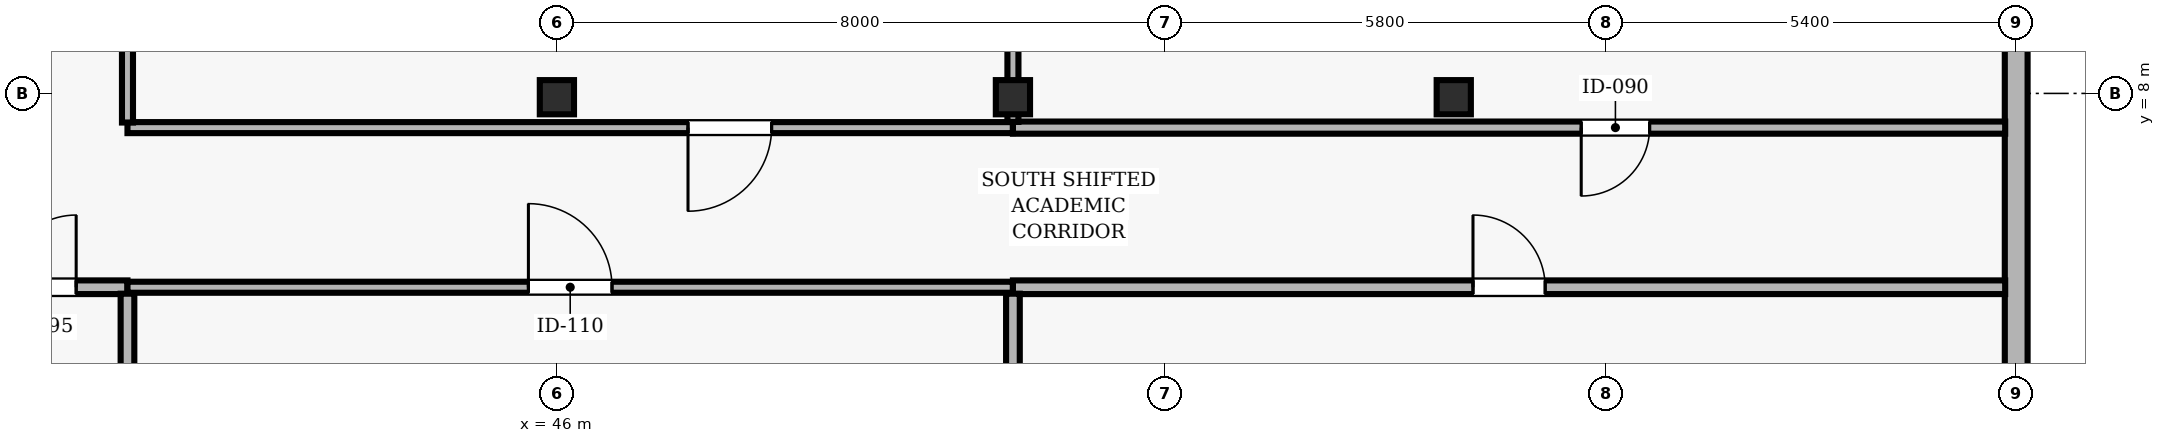
"""IFC4 building model, lengths in metres.
Left out: names, types, materials, properties, quantities, classifications, styles, units other than length and angle.
Written with IfcOpenShell. Run it as: python <this file> out.ifc"""

import sys

from ifc_helpers import new_model, si_unit, direction, frame, frame_2d, origin, origin_2d, place, context, subcontext, project, spatial, rectangle, hollow_rectangle, extrude, element, fill, save


model = new_model("IFC4")
c1 = context("Model", 3, precision=1e-05, world=origin(), true_north=direction((0.0, 1.0)))
c2 = subcontext(c1, "Body", "Model", "MODEL_VIEW")
j1 = project(units=[si_unit("LENGTHUNIT", "METRE"), si_unit("PLANEANGLEUNIT", "RADIAN")], contexts=[c1])
p1 = place(None, origin())
s1 = spatial("IfcSite", under=j1, at=p1, CompositionType="ELEMENT")
p2 = place(p1, origin())
s2 = spatial("IfcBuilding", under=s1, at=p2, CompositionType="ELEMENT")
p3 = place(p2, frame((0.0, 0.0, 191.4)))
s3 = spatial("IfcBuildingStorey", under=s2, at=p3, CompositionType="ELEMENT", Elevation=191.4)
for number, where, z_axis, x_axis in (
    (1, (46.0, 7.95, 0.0), (0.0, 0.0, 1.0), (1.0, 0.0, 0.0)),
    (2, (52.0, 7.95, 0.0), (0.0, 0.0, 1.0), (1.0, 0.0, 0.0)),
    (3, (57.8, 7.95, 0.0), (0.0, 0.0, 1.0), (1.0, 0.0, 0.0)),
):
    element("IfcColumn", number, at=place(p3, frame(where, z_axis=z_axis, x_axis=x_axis)), inside=s3, PredefinedType="COLUMN", context=c2, shape_type="SweptSolid", body=[
        extrude(hollow_rectangle(XDim=0.45, YDim=0.45, WallThickness=0.02, at=origin_2d()), origin(), (0.0, 0.0, 1.0), 3.9),
    ])
p4 = place(p3, frame((65.2, 2.5, 0.0), z_axis=(0.0, 0.0, 1.0), x_axis=(0.0, 1.0, 0.0)))
e4 = element("IfcWall", 4, at=p4, inside=s3, PredefinedType="SOLIDWALL", context=c2, shape_type="SweptSolid", body=[
    extrude(rectangle(XDim=11.0, YDim=0.3, at=frame_2d((5.5, 0.0))), origin(), (0.0, 0.0, 1.0), 3.69),
])
p5 = place(p4, frame((7.65, 0.0, 0.9)))
e5 = element("IfcOpeningElement", 5, at=p5, cuts=e4, PredefinedType="OPENING", context=c2, shape_type="SweptSolid", body=[
    extrude(rectangle(XDim=1.2, YDim=1.6, at=frame_2d((0.6, 0.8))), frame((0.0, 0.16, 0.0), z_axis=(0.0, -1.0, 0.0), x_axis=(1.0, 0.0, 0.0)), (0.0, 0.0, 1.0), 0.32),
])
p6 = place(p3, frame((38.05, 5.45, 0.0), z_axis=(0.0, 0.0, 1.0), x_axis=(1.0, 0.0, 0.0)))
e6 = element("IfcWall", 6, at=p6, inside=s3, PredefinedType="PARTITIONING", context=c2, shape_type="SweptSolid", body=[
    extrude(rectangle(XDim=2.3, YDim=0.18, at=frame_2d((1.15, 0.0))), origin(), (0.0, 0.0, 1.0), 3.343),
])
p7 = place(p6, frame((0.675, 0.0, 0.0)))
e7 = element("IfcOpeningElement", 7, at=p7, cuts=e6, PredefinedType="OPENING", context=c2, shape_type="SweptSolid", body=[
    extrude(rectangle(XDim=0.95, YDim=2.1, at=frame_2d((0.475, 1.05))), frame((0.0, 0.1, 0.0), z_axis=(0.0, -1.0, 0.0), x_axis=(1.0, 0.0, 0.0)), (0.0, 0.0, 1.0), 0.2),
])
p8 = place(p3, frame((40.35, 5.45, 0.0), z_axis=(0.0, 0.0, 1.0), x_axis=(1.0, 0.0, 0.0)))
e8 = element("IfcWall", 8, at=p8, inside=s3, PredefinedType="PARTITIONING", context=c2, shape_type="SweptSolid", body=[
    extrude(rectangle(XDim=11.65, YDim=0.145, at=frame_2d((5.825, 0.0))), origin(), (0.0, 0.0, 1.0), 3.343),
])
p9 = place(p8, frame((5.275, 0.0, 0.0)))
e9 = element("IfcOpeningElement", 9, at=p9, cuts=e8, PredefinedType="OPENING", context=c2, shape_type="SweptSolid", body=[
    extrude(rectangle(XDim=1.1, YDim=2.15, at=frame_2d((0.55, 1.075))), frame((0.0, 0.083, 0.0), z_axis=(0.0, -1.0, 0.0), x_axis=(1.0, 0.0, 0.0)), (0.0, 0.0, 1.0), 0.165),
])
p10 = place(p3, frame((52.0, 5.45, 0.0), z_axis=(0.0, 0.0, 1.0), x_axis=(1.0, 0.0, 0.0)))
e10 = element("IfcWall", 10, at=p10, inside=s3, PredefinedType="PARTITIONING", context=c2, shape_type="SweptSolid", body=[
    extrude(rectangle(XDim=13.055, YDim=0.18, at=frame_2d((6.527, 0.0))), origin(), (0.0, 0.0, 1.0), 3.343),
])
p11 = place(p10, frame((6.053, 0.0, 0.0)))
e11 = element("IfcOpeningElement", 11, at=p11, cuts=e10, PredefinedType="OPENING", context=c2, shape_type="SweptSolid", body=[
    extrude(rectangle(XDim=0.95, YDim=2.1, at=frame_2d((0.475, 1.05))), frame((0.0, 0.1, 0.0), z_axis=(0.0, -1.0, 0.0), x_axis=(1.0, 0.0, 0.0)), (0.0, 0.0, 1.0), 0.2),
])
p12 = place(p3, frame((52.0, 7.55, 0.0), z_axis=(0.0, 0.0, 1.0), x_axis=(-1.0, 0.0, 0.0)))
e12 = element("IfcWall", 12, at=p12, inside=s3, PredefinedType="PARTITIONING", context=c2, shape_type="SweptSolid", body=[
    extrude(rectangle(XDim=11.65, YDim=0.145, at=frame_2d((5.825, 0.0))), origin(), (0.0, 0.0, 1.0), 3.139),
])
p13 = place(p12, frame((3.175, 0.0, 0.0)))
e13 = element("IfcOpeningElement", 13, at=p13, cuts=e12, PredefinedType="OPENING", context=c2, shape_type="SweptSolid", body=[
    extrude(rectangle(XDim=1.1, YDim=2.15, at=frame_2d((0.55, 1.075))), frame((0.0, 0.083, 0.0), z_axis=(0.0, -1.0, 0.0), x_axis=(1.0, 0.0, 0.0)), (0.0, 0.0, 1.0), 0.165),
])
p14 = place(p3, frame((65.055, 7.55, 0.0), z_axis=(0.0, 0.0, 1.0), x_axis=(-1.0, 0.0, 0.0)))
e14 = element("IfcWall", 14, at=p14, inside=s3, PredefinedType="PARTITIONING", context=c2, shape_type="SweptSolid", body=[
    extrude(rectangle(XDim=13.055, YDim=0.16, at=frame_2d((6.527, 0.0))), origin(), (0.0, 0.0, 1.0), 3.139),
])
p15 = place(p14, frame((4.678, 0.0, 0.0)))
e15 = element("IfcOpeningElement", 15, at=p15, cuts=e14, PredefinedType="OPENING", context=c2, shape_type="SweptSolid", body=[
    extrude(rectangle(XDim=0.9, YDim=2.1, at=frame_2d((0.45, 1.05))), frame((0.0, 0.09, 0.0), z_axis=(0.0, -1.0, 0.0), x_axis=(1.0, 0.0, 0.0)), (0.0, 0.0, 1.0), 0.18),
])
p16 = place(p3, frame((40.35, 0.145, 0.0), z_axis=(0.0, 0.0, 1.0), x_axis=(0.0, 1.0, 0.0)))
e16 = element("IfcWall", 16, at=p16, inside=s3, PredefinedType="PARTITIONING", context=c2, shape_type="SweptSolid", body=[
    extrude(rectangle(XDim=5.22, YDim=0.18, at=frame_2d((2.61, 0.0))), origin(), (0.0, 0.0, 1.0), 3.69),
])
p17 = place(p3, frame((40.35, 7.617, 0.0), z_axis=(0.0, 0.0, 1.0), x_axis=(0.0, 1.0, 0.0)))
e17 = element("IfcWall", 17, at=p17, inside=s3, PredefinedType="PARTITIONING", context=c2, shape_type="SweptSolid", body=[
    extrude(rectangle(XDim=8.308, YDim=0.145, at=frame_2d((4.154, 0.0))), origin(), (0.0, 0.0, 1.0), 3.343),
])
p18 = place(p3, frame((52.0, 0.145, 0.0), z_axis=(0.0, 0.0, 1.0), x_axis=(0.0, 1.0, 0.0)))
e18 = element("IfcWall", 18, at=p18, inside=s3, PredefinedType="PARTITIONING", context=c2, shape_type="SweptSolid", body=[
    extrude(rectangle(XDim=5.22, YDim=0.18, at=frame_2d((2.61, 0.0))), origin(), (0.0, 0.0, 1.0), 3.139),
])
p19 = place(p3, frame((52.0, 7.625, 0.0), z_axis=(0.0, 0.0, 1.0), x_axis=(0.0, 1.0, 0.0)))
e19 = element("IfcWall", 19, at=p19, inside=s3, PredefinedType="PARTITIONING", context=c2, shape_type="SweptSolid", body=[
    extrude(rectangle(XDim=8.23, YDim=0.145, at=frame_2d((4.115, 0.0))), origin(), (0.0, 0.0, 1.0), 3.139),
])
p20 = place(p7, origin())
e20 = element("IfcDoor", 20, at=p20, inside=s3, OperationType="SINGLE_SWING_RIGHT", PredefinedType="DOOR", context=c2, shape_type="SweptSolid", body=[
    extrude(rectangle(XDim=0.95, YDim=2.1, at=frame_2d((0.475, 1.05))), frame((0.0, 0.025, 0.0), z_axis=(0.0, -1.0, 0.0), x_axis=(1.0, 0.0, 0.0)), (0.0, 0.0, 1.0), 0.05),
])
fill(e7, e20)
p21 = place(p9, origin())
e21 = element("IfcDoor", 21, at=p21, inside=s3, OperationType="SINGLE_SWING_LEFT", PredefinedType="DOOR", context=c2, shape_type="SweptSolid", body=[
    extrude(rectangle(XDim=1.1, YDim=2.15, at=frame_2d((0.55, 1.075))), frame((0.0, 0.025, 0.0), z_axis=(0.0, -1.0, 0.0), x_axis=(1.0, 0.0, 0.0)), (0.0, 0.0, 1.0), 0.05),
])
fill(e9, e21)
p22 = place(p13, origin())
e22 = element("IfcDoor", 22, at=p22, inside=s3, OperationType="SINGLE_SWING_RIGHT", PredefinedType="DOOR", context=c2, shape_type="SweptSolid", body=[
    extrude(rectangle(XDim=1.1, YDim=2.15, at=frame_2d((0.55, 1.075))), frame((0.0, 0.025, 0.0), z_axis=(0.0, -1.0, 0.0), x_axis=(1.0, 0.0, 0.0)), (0.0, 0.0, 1.0), 0.05),
])
fill(e13, e22)
p23 = place(p11, origin())
e23 = element("IfcDoor", 23, at=p23, inside=s3, OperationType="SINGLE_SWING_LEFT", PredefinedType="DOOR", context=c2, shape_type="SweptSolid", body=[
    extrude(rectangle(XDim=0.95, YDim=2.1, at=frame_2d((0.475, 1.05))), frame((0.0, 0.025, 0.0), z_axis=(0.0, -1.0, 0.0), x_axis=(1.0, 0.0, 0.0)), (0.0, 0.0, 1.0), 0.05),
])
fill(e11, e23)
p24 = place(p15, origin())
e24 = element("IfcDoor", 24, at=p24, inside=s3, OperationType="SINGLE_SWING_RIGHT", PredefinedType="DOOR", context=c2, shape_type="SweptSolid", body=[
    extrude(rectangle(XDim=0.9, YDim=2.1, at=frame_2d((0.45, 1.05))), frame((0.0, 0.025, 0.0), z_axis=(0.0, -1.0, 0.0), x_axis=(1.0, 0.0, 0.0)), (0.0, 0.0, 1.0), 0.05),
])
fill(e15, e24)
save(model, sys.argv[1])
